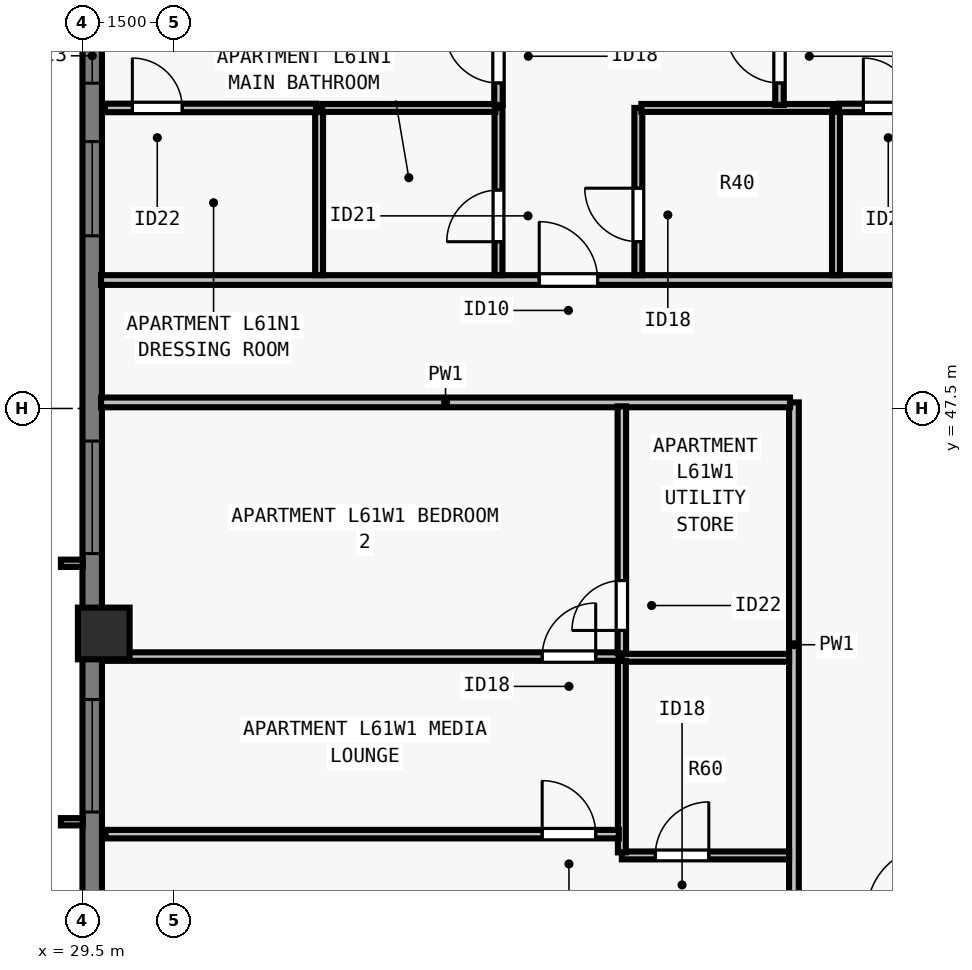
"""IFC4 building model, lengths in metres.
Left out: names, types, materials, properties, quantities, classifications, styles, units other than length and angle.
Written with IfcOpenShell. Run it as: python <this file> out.ifc"""

import sys

from ifc_helpers import new_model, si_unit, direction, frame, frame_2d, origin, origin_2d, place, context, subcontext, project, spatial, rectangle, extrude, element, fill, save


model = new_model("IFC4")
c1 = context("Model", 3, precision=1e-05, world=origin(), true_north=direction((0.0, 1.0)))
c2 = subcontext(c1, "Body", "Model", "MODEL_VIEW")
j1 = project(units=[si_unit("LENGTHUNIT", "METRE"), si_unit("PLANEANGLEUNIT", "RADIAN")], contexts=[c1])
p1 = place(None, origin())
s1 = spatial("IfcSite", under=j1, at=p1, CompositionType="ELEMENT")
p2 = place(p1, origin())
s2 = spatial("IfcBuilding", under=s1, at=p2, CompositionType="ELEMENT")
p3 = place(p2, frame((0.0, 0.0, 223.5)))
s3 = spatial("IfcBuildingStorey", under=s2, at=p3, CompositionType="ELEMENT", Elevation=223.5)
p4 = place(p3, frame((29.85, 43.8, 0.0), z_axis=(0.0, 0.0, 1.0), x_axis=(0.0, 1.0, 0.0)))
e1 = element("IfcColumn", 1, at=p4, inside=s3, PredefinedType="COLUMN", context=c2, shape_type="SweptSolid", body=[
    extrude(rectangle(XDim=0.85, YDim=0.85, at=origin_2d()), origin(), (0.0, 0.0, 1.0), 3.5),
])
p5 = place(p3, frame((29.66, 21.5, 0.0), z_axis=(0.0, 0.0, 1.0), x_axis=(0.0, 1.0, 0.0)))
e2 = element("IfcWall", 2, at=p5, inside=s3, PredefinedType="SOLIDWALL", context=c2, shape_type="SweptSolid", body=[
    extrude(rectangle(XDim=34.702, YDim=0.32, at=frame_2d((17.351, 0.0))), origin(), (0.0, 0.0, 1.0), 3.29),
])
p6 = place(p5, frame((4.613, 0.0, 0.8)))
e3 = element("IfcOpeningElement", 3, at=p6, cuts=e2, PredefinedType="OPENING", context=c2, shape_type="SweptSolid", body=[
    extrude(rectangle(XDim=1.85, YDim=1.678, at=frame_2d((0.925, 0.839))), frame((0.0, 0.17, 0.0), z_axis=(0.0, -1.0, 0.0), x_axis=(1.0, 0.0, 0.0)), (0.0, 0.0, 1.0), 0.34),
])
p7 = place(p5, frame((9.388, 0.0, 0.8)))
e4 = element("IfcOpeningElement", 4, at=p7, cuts=e2, PredefinedType="OPENING", context=c2, shape_type="SweptSolid", body=[
    extrude(rectangle(XDim=1.55, YDim=1.678, at=frame_2d((0.775, 0.839))), frame((0.0, 0.17, 0.0), z_axis=(0.0, -1.0, 0.0), x_axis=(1.0, 0.0, 0.0)), (0.0, 0.0, 1.0), 0.34),
])
p8 = place(p5, frame((14.888, 0.0, 0.8)))
e5 = element("IfcOpeningElement", 5, at=p8, cuts=e2, PredefinedType="OPENING", context=c2, shape_type="SweptSolid", body=[
    extrude(rectangle(XDim=1.55, YDim=1.678, at=frame_2d((0.775, 0.839))), frame((0.0, 0.17, 0.0), z_axis=(0.0, -1.0, 0.0), x_axis=(1.0, 0.0, 0.0)), (0.0, 0.0, 1.0), 0.34),
])
p9 = place(p5, frame((19.364, 0.0, 0.8)))
e6 = element("IfcOpeningElement", 6, at=p9, cuts=e2, PredefinedType="OPENING", context=c2, shape_type="SweptSolid", body=[
    extrude(rectangle(XDim=1.85, YDim=1.678, at=frame_2d((0.925, 0.839))), frame((0.0, 0.17, 0.0), z_axis=(0.0, -1.0, 0.0), x_axis=(1.0, 0.0, 0.0)), (0.0, 0.0, 1.0), 0.34),
])
p10 = place(p5, frame((23.614, 0.0, 0.8)))
e7 = element("IfcOpeningElement", 7, at=p10, cuts=e2, PredefinedType="OPENING", context=c2, shape_type="SweptSolid", body=[
    extrude(rectangle(XDim=1.85, YDim=1.678, at=frame_2d((0.925, 0.839))), frame((0.0, 0.17, 0.0), z_axis=(0.0, -1.0, 0.0), x_axis=(1.0, 0.0, 0.0)), (0.0, 0.0, 1.0), 0.34),
])
p11 = place(p5, frame((28.839, 0.0, 0.8)))
e8 = element("IfcOpeningElement", 8, at=p11, cuts=e2, PredefinedType="OPENING", context=c2, shape_type="SweptSolid", body=[
    extrude(rectangle(XDim=1.55, YDim=1.678, at=frame_2d((0.775, 0.839))), frame((0.0, 0.17, 0.0), z_axis=(0.0, -1.0, 0.0), x_axis=(1.0, 0.0, 0.0)), (0.0, 0.0, 1.0), 0.34),
])
p12 = place(p5, frame((31.35, 0.0, 0.8)))
e9 = element("IfcOpeningElement", 9, at=p12, cuts=e2, PredefinedType="OPENING", context=c2, shape_type="SweptSolid", body=[
    extrude(rectangle(XDim=0.9, YDim=1.678, at=frame_2d((0.45, 0.839))), frame((0.0, 0.17, 0.0), z_axis=(0.0, -1.0, 0.0), x_axis=(1.0, 0.0, 0.0)), (0.0, 0.0, 1.0), 0.34),
])
p13 = place(p3, frame((29.805, 49.613, 0.0), z_axis=(0.0, 0.0, 1.0), x_axis=(1.0, 0.0, 0.0)))
e10 = element("IfcWall", 10, at=p13, inside=s3, PredefinedType="PARTITIONING", context=c2, shape_type="SweptSolid", body=[
    extrude(rectangle(XDim=44.39, YDim=0.16, at=frame_2d((22.195, 0.0))), origin(), (0.0, 0.0, 1.0), 2.958),
])
p14 = place(p13, frame((7.206, 0.0, 0.0)))
e11 = element("IfcOpeningElement", 11, at=p14, cuts=e10, PredefinedType="OPENING", context=c2, shape_type="SweptSolid", body=[
    extrude(rectangle(XDim=0.96, YDim=2.18, at=frame_2d((0.48, 1.09))), frame((0.0, 0.09, 0.0), z_axis=(0.0, -1.0, 0.0), x_axis=(1.0, 0.0, 0.0)), (0.0, 0.0, 1.0), 0.18),
])
p15 = place(p13, frame((21.78, 0.0, 0.0)))
e12 = element("IfcOpeningElement", 12, at=p15, cuts=e10, PredefinedType="OPENING", context=c2, shape_type="SweptSolid", body=[
    extrude(rectangle(XDim=0.96, YDim=2.18, at=frame_2d((0.48, 1.09))), frame((0.0, 0.09, 0.0), z_axis=(0.0, -1.0, 0.0), x_axis=(1.0, 0.0, 0.0)), (0.0, 0.0, 1.0), 0.18),
])
p16 = place(p13, frame((36.289, 0.0, 0.0)))
e13 = element("IfcOpeningElement", 13, at=p16, cuts=e10, PredefinedType="OPENING", context=c2, shape_type="SweptSolid", body=[
    extrude(rectangle(XDim=0.96, YDim=2.18, at=frame_2d((0.48, 1.09))), frame((0.0, 0.09, 0.0), z_axis=(0.0, -1.0, 0.0), x_axis=(1.0, 0.0, 0.0)), (0.0, 0.0, 1.0), 0.18),
])
p17 = place(p3, frame((41.2, 30.4, 0.0), z_axis=(0.0, 0.0, 1.0), x_axis=(0.0, 1.0, 0.0)))
e14 = element("IfcWall", 14, at=p17, inside=s3, PredefinedType="PARTITIONING", context=c2, shape_type="SweptSolid", body=[
    extrude(rectangle(XDim=17.2, YDim=0.16, at=frame_2d((8.6, 0.0))), origin(), (0.0, 0.0, 1.0), 3.29),
])
p18 = place(p17, frame((8.12, 0.0, 0.0)))
e15 = element("IfcOpeningElement", 15, at=p18, cuts=e14, PredefinedType="OPENING", context=c2, shape_type="SweptSolid", body=[
    extrude(rectangle(XDim=0.96, YDim=2.18, at=frame_2d((0.48, 1.09))), frame((0.0, 0.09, 0.0), z_axis=(0.0, -1.0, 0.0), x_axis=(1.0, 0.0, 0.0)), (0.0, 0.0, 1.0), 0.18),
])
p19 = place(p3, frame((29.805, 47.6, 0.0), z_axis=(0.0, 0.0, 1.0), x_axis=(1.0, 0.0, 0.0)))
e16 = element("IfcWall", 16, at=p19, inside=s3, PredefinedType="PARTITIONING", context=c2, shape_type="SweptSolid", body=[
    extrude(rectangle(XDim=11.33, YDim=0.16, at=frame_2d((5.665, 0.0))), origin(), (0.0, 0.0, 1.0), 3.29),
])
p20 = place(p3, frame((33.391, 49.692, 0.0), z_axis=(0.0, 0.0, 1.0), x_axis=(0.0, 1.0, 0.0)))
e17 = element("IfcWall", 17, at=p20, inside=s3, PredefinedType="PLUMBINGWALL", context=c2, shape_type="SweptSolid", body=[
    extrude(rectangle(XDim=2.75, YDim=0.13, at=frame_2d((1.375, 0.0))), origin(), (0.0, 0.0, 1.0), 3.29),
])
p21 = place(p3, frame((36.341, 49.692, 0.0), z_axis=(0.0, 0.0, 1.0), x_axis=(0.0, 1.0, 0.0)))
e18 = element("IfcWall", 18, at=p21, inside=s3, PredefinedType="PLUMBINGWALL", context=c2, shape_type="SweptSolid", body=[
    extrude(rectangle(XDim=2.75, YDim=0.13, at=frame_2d((1.375, 0.0))), origin(), (0.0, 0.0, 1.0), 3.29),
])
p22 = place(p21, frame((0.55, 0.0, 0.0)))
e19 = element("IfcOpeningElement", 19, at=p22, cuts=e18, PredefinedType="OPENING", context=c2, shape_type="SweptSolid", body=[
    extrude(rectangle(XDim=0.85, YDim=2.08, at=frame_2d((0.425, 1.04))), frame((0.0, 0.075, 0.0), z_axis=(0.0, -1.0, 0.0), x_axis=(1.0, 0.0, 0.0)), (0.0, 0.0, 1.0), 0.15),
])
p23 = place(p3, frame((33.441, 52.442, 0.0), z_axis=(0.0, 0.0, 1.0), x_axis=(1.0, 0.0, 0.0)))
e20 = element("IfcWall", 20, at=p23, inside=s3, PredefinedType="PLUMBINGWALL", context=c2, shape_type="SweptSolid", body=[
    extrude(rectangle(XDim=2.85, YDim=0.13, at=frame_2d((1.425, 0.0))), origin(), (0.0, 0.0, 1.0), 2.958),
])
p24 = place(p3, frame((41.891, 49.692, 0.0), z_axis=(0.0, 0.0, 1.0), x_axis=(0.0, 1.0, 0.0)))
e21 = element("IfcWall", 21, at=p24, inside=s3, PredefinedType="PLUMBINGWALL", context=c2, shape_type="SweptSolid", body=[
    extrude(rectangle(XDim=2.75, YDim=0.13, at=frame_2d((1.375, 0.0))), origin(), (0.0, 0.0, 1.0), 2.573),
])
p25 = place(p3, frame((38.641, 49.692, 0.0), z_axis=(0.0, 0.0, 1.0), x_axis=(0.0, 1.0, 0.0)))
e22 = element("IfcWall", 22, at=p25, inside=s3, PredefinedType="PLUMBINGWALL", context=c2, shape_type="SweptSolid", body=[
    extrude(rectangle(XDim=2.75, YDim=0.13, at=frame_2d((1.375, 0.0))), origin(), (0.0, 0.0, 1.0), 3.29),
])
p26 = place(p25, frame((0.55, 0.0, 0.0)))
e23 = element("IfcOpeningElement", 23, at=p26, cuts=e22, PredefinedType="OPENING", context=c2, shape_type="SweptSolid", body=[
    extrude(rectangle(XDim=0.88, YDim=2.1, at=frame_2d((0.44, 1.05))), frame((0.0, 0.075, 0.0), z_axis=(0.0, -1.0, 0.0), x_axis=(1.0, 0.0, 0.0)), (0.0, 0.0, 1.0), 0.15),
])
p27 = place(p3, frame((38.691, 52.442, 0.0), z_axis=(0.0, 0.0, 1.0), x_axis=(1.0, 0.0, 0.0)))
e24 = element("IfcWall", 24, at=p27, inside=s3, PredefinedType="PLUMBINGWALL", context=c2, shape_type="SweptSolid", body=[
    extrude(rectangle(XDim=3.15, YDim=0.13, at=frame_2d((1.575, 0.0))), origin(), (0.0, 0.0, 1.0), 3.29),
])
p28 = place(p3, frame((36.341, 52.492, 0.0), z_axis=(0.0, 0.0, 1.0), x_axis=(0.0, 1.0, 0.0)))
e25 = element("IfcWall", 25, at=p28, inside=s3, PredefinedType="PARTITIONING", context=c2, shape_type="SweptSolid", body=[
    extrude(rectangle(XDim=8.628, YDim=0.14, at=frame_2d((4.314, 0.0))), origin(), (0.0, 0.0, 1.0), 2.573),
])
p29 = place(p28, frame((0.36, 0.0, 0.0)))
e26 = element("IfcOpeningElement", 26, at=p29, cuts=e25, PredefinedType="OPENING", context=c2, shape_type="SweptSolid", body=[
    extrude(rectangle(XDim=0.88, YDim=2.1, at=frame_2d((0.44, 1.05))), frame((0.0, 0.08, 0.0), z_axis=(0.0, -1.0, 0.0), x_axis=(1.0, 0.0, 0.0)), (0.0, 0.0, 1.0), 0.16),
])
p30 = place(p3, frame((29.87, 52.442, 0.0), z_axis=(0.0, 0.0, 1.0), x_axis=(1.0, 0.0, 0.0)))
e27 = element("IfcWall", 27, at=p30, inside=s3, PredefinedType="PARTITIONING", context=c2, shape_type="SweptSolid", body=[
    extrude(rectangle(XDim=3.471, YDim=0.14, at=frame_2d((1.736, 0.0))), origin(), (0.0, 0.0, 1.0), 3.29),
])
p31 = place(p30, frame((0.45, 0.0, 0.0)))
e28 = element("IfcOpeningElement", 28, at=p31, cuts=e27, PredefinedType="OPENING", context=c2, shape_type="SweptSolid", body=[
    extrude(rectangle(XDim=0.82, YDim=2.1, at=frame_2d((0.41, 1.05))), frame((0.0, 0.08, 0.0), z_axis=(0.0, -1.0, 0.0), x_axis=(1.0, 0.0, 0.0)), (0.0, 0.0, 1.0), 0.16),
])
p32 = place(p3, frame((40.962, 52.492, 0.0), z_axis=(0.0, 0.0, 1.0), x_axis=(0.0, 1.0, 0.0)))
e29 = element("IfcWall", 29, at=p32, inside=s3, PredefinedType="PARTITIONING", context=c2, shape_type="SweptSolid", body=[
    extrude(rectangle(XDim=6.448, YDim=0.14, at=frame_2d((3.224, 0.0))), origin(), (0.0, 0.0, 1.0), 3.29),
])
p33 = place(p32, frame((0.36, 0.0, 0.0)))
e30 = element("IfcOpeningElement", 30, at=p33, cuts=e29, PredefinedType="OPENING", context=c2, shape_type="SweptSolid", body=[
    extrude(rectangle(XDim=0.88, YDim=2.1, at=frame_2d((0.44, 1.05))), frame((0.0, 0.08, 0.0), z_axis=(0.0, -1.0, 0.0), x_axis=(1.0, 0.0, 0.0)), (0.0, 0.0, 1.0), 0.16),
])
p34 = place(p3, frame((41.941, 52.442, 0.0), z_axis=(0.0, 0.0, 1.0), x_axis=(1.0, 0.0, 0.0)))
e31 = element("IfcWall", 31, at=p34, inside=s3, PredefinedType="PARTITIONING", context=c2, shape_type="SweptSolid", body=[
    extrude(rectangle(XDim=3.171, YDim=0.14, at=frame_2d((1.586, 0.0))), origin(), (0.0, 0.0, 1.0), 3.29),
])
p35 = place(p34, frame((0.4, 0.0, 0.0)))
e32 = element("IfcOpeningElement", 32, at=p35, cuts=e31, PredefinedType="OPENING", context=c2, shape_type="SweptSolid", body=[
    extrude(rectangle(XDim=0.82, YDim=2.1, at=frame_2d((0.41, 1.05))), frame((0.0, 0.08, 0.0), z_axis=(0.0, -1.0, 0.0), x_axis=(1.0, 0.0, 0.0)), (0.0, 0.0, 1.0), 0.16),
])
p36 = place(p3, frame((38.37, 43.4, 0.0), z_axis=(0.0, 0.0, 1.0), x_axis=(1.0, 0.0, 0.0)))
e33 = element("IfcWall", 33, at=p36, inside=s3, PredefinedType="PLUMBINGWALL", context=c2, shape_type="SweptSolid", body=[
    extrude(rectangle(XDim=2.75, YDim=0.13, at=frame_2d((1.375, 0.0))), origin(), (0.0, 0.0, 1.0), 2.958),
])
p37 = place(p3, frame((38.37, 40.15, 0.0), z_axis=(0.0, 0.0, 1.0), x_axis=(1.0, 0.0, 0.0)))
e34 = element("IfcWall", 34, at=p37, inside=s3, PredefinedType="PLUMBINGWALL", context=c2, shape_type="SweptSolid", body=[
    extrude(rectangle(XDim=2.75, YDim=0.13, at=frame_2d((1.375, 0.0))), origin(), (0.0, 0.0, 1.0), 3.29),
])
p38 = place(p37, frame((0.55, 0.0, 0.0)))
e35 = element("IfcOpeningElement", 35, at=p38, cuts=e34, PredefinedType="OPENING", context=c2, shape_type="SweptSolid", body=[
    extrude(rectangle(XDim=0.88, YDim=2.1, at=frame_2d((0.44, 1.05))), frame((0.0, 0.075, 0.0), z_axis=(0.0, -1.0, 0.0), x_axis=(1.0, 0.0, 0.0)), (0.0, 0.0, 1.0), 0.15),
])
p39 = place(p3, frame((38.37, 40.2, 0.0), z_axis=(0.0, 0.0, 1.0), x_axis=(0.0, 1.0, 0.0)))
e36 = element("IfcWall", 36, at=p39, inside=s3, PredefinedType="PLUMBINGWALL", context=c2, shape_type="SweptSolid", body=[
    extrude(rectangle(XDim=3.15, YDim=0.13, at=frame_2d((1.575, 0.0))), origin(), (0.0, 0.0, 1.0), 3.29),
])
p40 = place(p3, frame((29.88, 43.42, 0.0), z_axis=(0.0, 0.0, 1.0), x_axis=(1.0, 0.0, 0.0)))
e37 = element("IfcWall", 37, at=p40, inside=s3, PredefinedType="PARTITIONING", context=c2, shape_type="SweptSolid", body=[
    extrude(rectangle(XDim=8.44, YDim=0.14, at=frame_2d((4.22, 0.0))), origin(), (0.0, 0.0, 1.0), 3.29),
])
p41 = place(p40, frame((7.18, 0.0, 0.0)))
e38 = element("IfcOpeningElement", 38, at=p41, cuts=e37, PredefinedType="OPENING", context=c2, shape_type="SweptSolid", body=[
    extrude(rectangle(XDim=0.88, YDim=2.1, at=frame_2d((0.44, 1.05))), frame((0.0, 0.08, 0.0), z_axis=(0.0, -1.0, 0.0), x_axis=(1.0, 0.0, 0.0)), (0.0, 0.0, 1.0), 0.16),
])
p42 = place(p3, frame((38.37, 43.475, 0.0), z_axis=(0.0, 0.0, 1.0), x_axis=(0.0, 1.0, 0.0)))
e39 = element("IfcWall", 39, at=p42, inside=s3, PredefinedType="PARTITIONING", context=c2, shape_type="SweptSolid", body=[
    extrude(rectangle(XDim=4.06, YDim=0.14, at=frame_2d((2.03, 0.0))), origin(), (0.0, 0.0, 1.0), 3.29),
])
p43 = place(p42, frame((0.375, 0.0, 0.0)))
e40 = element("IfcOpeningElement", 40, at=p43, cuts=e39, PredefinedType="OPENING", context=c2, shape_type="SweptSolid", body=[
    extrude(rectangle(XDim=0.82, YDim=2.1, at=frame_2d((0.41, 1.05))), frame((0.0, 0.08, 0.0), z_axis=(0.0, -1.0, 0.0), x_axis=(1.0, 0.0, 0.0)), (0.0, 0.0, 1.0), 0.16),
])
p44 = place(p3, frame((29.88, 40.5, 0.0), z_axis=(0.0, 0.0, 1.0), x_axis=(1.0, 0.0, 0.0)))
e41 = element("IfcWall", 41, at=p44, inside=s3, PredefinedType="PARTITIONING", context=c2, shape_type="SweptSolid", body=[
    extrude(rectangle(XDim=8.44, YDim=0.14, at=frame_2d((4.22, 0.0))), origin(), (0.0, 0.0, 1.0), 2.958),
])
p45 = place(p44, frame((7.18, 0.0, 0.0)))
e42 = element("IfcOpeningElement", 42, at=p45, cuts=e41, PredefinedType="OPENING", context=c2, shape_type="SweptSolid", body=[
    extrude(rectangle(XDim=0.88, YDim=2.1, at=frame_2d((0.44, 1.05))), frame((0.0, 0.08, 0.0), z_axis=(0.0, -1.0, 0.0), x_axis=(1.0, 0.0, 0.0)), (0.0, 0.0, 1.0), 0.16),
])
p46 = place(p9, origin())
e43 = element("IfcWindow", 43, at=p46, inside=s3, PartitioningType="SINGLE_PANEL", PredefinedType="WINDOW", context=c2, shape_type="SweptSolid", body=[
    extrude(rectangle(XDim=1.85, YDim=1.678, at=frame_2d((0.925, 0.839))), frame((0.0, -0.05, 0.0), z_axis=(0.0, -1.0, 0.0), x_axis=(1.0, 0.0, 0.0)), (0.0, 0.0, 1.0), 0.06),
])
fill(e6, e43)
p47 = place(p10, origin())
e44 = element("IfcWindow", 44, at=p47, inside=s3, PartitioningType="SINGLE_PANEL", PredefinedType="WINDOW", context=c2, shape_type="SweptSolid", body=[
    extrude(rectangle(XDim=1.85, YDim=1.678, at=frame_2d((0.925, 0.839))), frame((0.0, -0.05, 0.0), z_axis=(0.0, -1.0, 0.0), x_axis=(1.0, 0.0, 0.0)), (0.0, 0.0, 1.0), 0.06),
])
fill(e7, e44)
p48 = place(p11, origin())
e45 = element("IfcWindow", 45, at=p48, inside=s3, PartitioningType="SINGLE_PANEL", PredefinedType="WINDOW", context=c2, shape_type="SweptSolid", body=[
    extrude(rectangle(XDim=1.55, YDim=1.678, at=frame_2d((0.775, 0.839))), frame((0.0, -0.05, 0.0), z_axis=(0.0, -1.0, 0.0), x_axis=(1.0, 0.0, 0.0)), (0.0, 0.0, 1.0), 0.06),
])
fill(e8, e45)
p49 = place(p12, origin())
e46 = element("IfcWindow", 46, at=p49, inside=s3, PartitioningType="SINGLE_PANEL", PredefinedType="WINDOW", context=c2, shape_type="SweptSolid", body=[
    extrude(rectangle(XDim=0.9, YDim=1.678, at=frame_2d((0.45, 0.839))), frame((0.0, -0.04, 0.0), z_axis=(0.0, -1.0, 0.0), x_axis=(1.0, 0.0, 0.0)), (0.0, 0.0, 1.0), 0.06),
])
fill(e9, e46)
p50 = place(p22, origin())
e47 = element("IfcDoor", 47, at=p50, inside=s3, OperationType="SINGLE_SWING_LEFT", PredefinedType="DOOR", context=c2, shape_type="SweptSolid", body=[
    extrude(rectangle(XDim=0.85, YDim=2.08, at=frame_2d((0.425, 1.04))), frame((0.0, 0.025, 0.0), z_axis=(0.0, -1.0, 0.0), x_axis=(1.0, 0.0, 0.0)), (0.0, 0.0, 1.0), 0.05),
])
fill(e19, e47)
p51 = place(p26, origin())
e48 = element("IfcDoor", 48, at=p51, inside=s3, OperationType="SINGLE_SWING_RIGHT", PredefinedType="DOOR", context=c2, shape_type="SweptSolid", body=[
    extrude(rectangle(XDim=0.88, YDim=2.1, at=frame_2d((0.44, 1.05))), frame((0.0, 0.025, 0.0), z_axis=(0.0, -1.0, 0.0), x_axis=(1.0, 0.0, 0.0)), (0.0, 0.0, 1.0), 0.05),
])
fill(e23, e48)
p52 = place(p31, origin())
e49 = element("IfcDoor", 49, at=p52, inside=s3, OperationType="SINGLE_SWING_LEFT", PredefinedType="DOOR", context=c2, shape_type="SweptSolid", body=[
    extrude(rectangle(XDim=0.82, YDim=2.1, at=frame_2d((0.41, 1.05))), frame((0.0, 0.025, 0.0), z_axis=(0.0, -1.0, 0.0), x_axis=(1.0, 0.0, 0.0)), (0.0, 0.0, 1.0), 0.05),
])
fill(e28, e49)
p53 = place(p29, origin())
e50 = element("IfcDoor", 50, at=p53, inside=s3, OperationType="SINGLE_SWING_RIGHT", PredefinedType="DOOR", context=c2, shape_type="SweptSolid", body=[
    extrude(rectangle(XDim=0.88, YDim=2.1, at=frame_2d((0.44, 1.05))), frame((0.0, 0.025, 0.0), z_axis=(0.0, -1.0, 0.0), x_axis=(1.0, 0.0, 0.0)), (0.0, 0.0, 1.0), 0.05),
])
fill(e26, e50)
p54 = place(p35, origin())
e51 = element("IfcDoor", 51, at=p54, inside=s3, OperationType="SINGLE_SWING_LEFT", PredefinedType="DOOR", context=c2, shape_type="SweptSolid", body=[
    extrude(rectangle(XDim=0.82, YDim=2.1, at=frame_2d((0.41, 1.05))), frame((0.0, 0.025, 0.0), z_axis=(0.0, -1.0, 0.0), x_axis=(1.0, 0.0, 0.0)), (0.0, 0.0, 1.0), 0.05),
])
fill(e32, e51)
p55 = place(p33, origin())
e52 = element("IfcDoor", 52, at=p55, inside=s3, OperationType="SINGLE_SWING_RIGHT", PredefinedType="DOOR", context=c2, shape_type="SweptSolid", body=[
    extrude(rectangle(XDim=0.88, YDim=2.1, at=frame_2d((0.44, 1.05))), frame((0.0, 0.025, 0.0), z_axis=(0.0, -1.0, 0.0), x_axis=(1.0, 0.0, 0.0)), (0.0, 0.0, 1.0), 0.05),
])
fill(e30, e52)
p56 = place(p14, origin())
e53 = element("IfcDoor", 53, at=p56, inside=s3, OperationType="SINGLE_SWING_LEFT", PredefinedType="DOOR", context=c2, shape_type="SweptSolid", body=[
    extrude(rectangle(XDim=0.96, YDim=2.18, at=frame_2d((0.48, 1.09))), frame((0.0, 0.025, 0.0), z_axis=(0.0, -1.0, 0.0), x_axis=(1.0, 0.0, 0.0)), (0.0, 0.0, 1.0), 0.05),
])
fill(e11, e53)
p57 = place(p38, origin())
e54 = element("IfcDoor", 54, at=p57, inside=s3, OperationType="SINGLE_SWING_RIGHT", PredefinedType="DOOR", context=c2, shape_type="SweptSolid", body=[
    extrude(rectangle(XDim=0.88, YDim=2.1, at=frame_2d((0.44, 1.05))), frame((0.0, 0.025, 0.0), z_axis=(0.0, -1.0, 0.0), x_axis=(1.0, 0.0, 0.0)), (0.0, 0.0, 1.0), 0.05),
])
fill(e35, e54)
p58 = place(p43, origin())
e55 = element("IfcDoor", 55, at=p58, inside=s3, OperationType="SINGLE_SWING_LEFT", PredefinedType="DOOR", context=c2, shape_type="SweptSolid", body=[
    extrude(rectangle(XDim=0.82, YDim=2.1, at=frame_2d((0.41, 1.05))), frame((0.0, 0.025, 0.0), z_axis=(0.0, -1.0, 0.0), x_axis=(1.0, 0.0, 0.0)), (0.0, 0.0, 1.0), 0.05),
])
fill(e40, e55)
p59 = place(p41, origin())
e56 = element("IfcDoor", 56, at=p59, inside=s3, OperationType="SINGLE_SWING_RIGHT", PredefinedType="DOOR", context=c2, shape_type="SweptSolid", body=[
    extrude(rectangle(XDim=0.88, YDim=2.1, at=frame_2d((0.44, 1.05))), frame((0.0, 0.025, 0.0), z_axis=(0.0, -1.0, 0.0), x_axis=(1.0, 0.0, 0.0)), (0.0, 0.0, 1.0), 0.05),
])
fill(e38, e56)
p60 = place(p45, origin())
e57 = element("IfcDoor", 57, at=p60, inside=s3, OperationType="SINGLE_SWING_LEFT", PredefinedType="DOOR", context=c2, shape_type="SweptSolid", body=[
    extrude(rectangle(XDim=0.88, YDim=2.1, at=frame_2d((0.44, 1.05))), frame((0.0, 0.025, 0.0), z_axis=(0.0, -1.0, 0.0), x_axis=(1.0, 0.0, 0.0)), (0.0, 0.0, 1.0), 0.05),
])
fill(e42, e57)
save(model, sys.argv[1])
